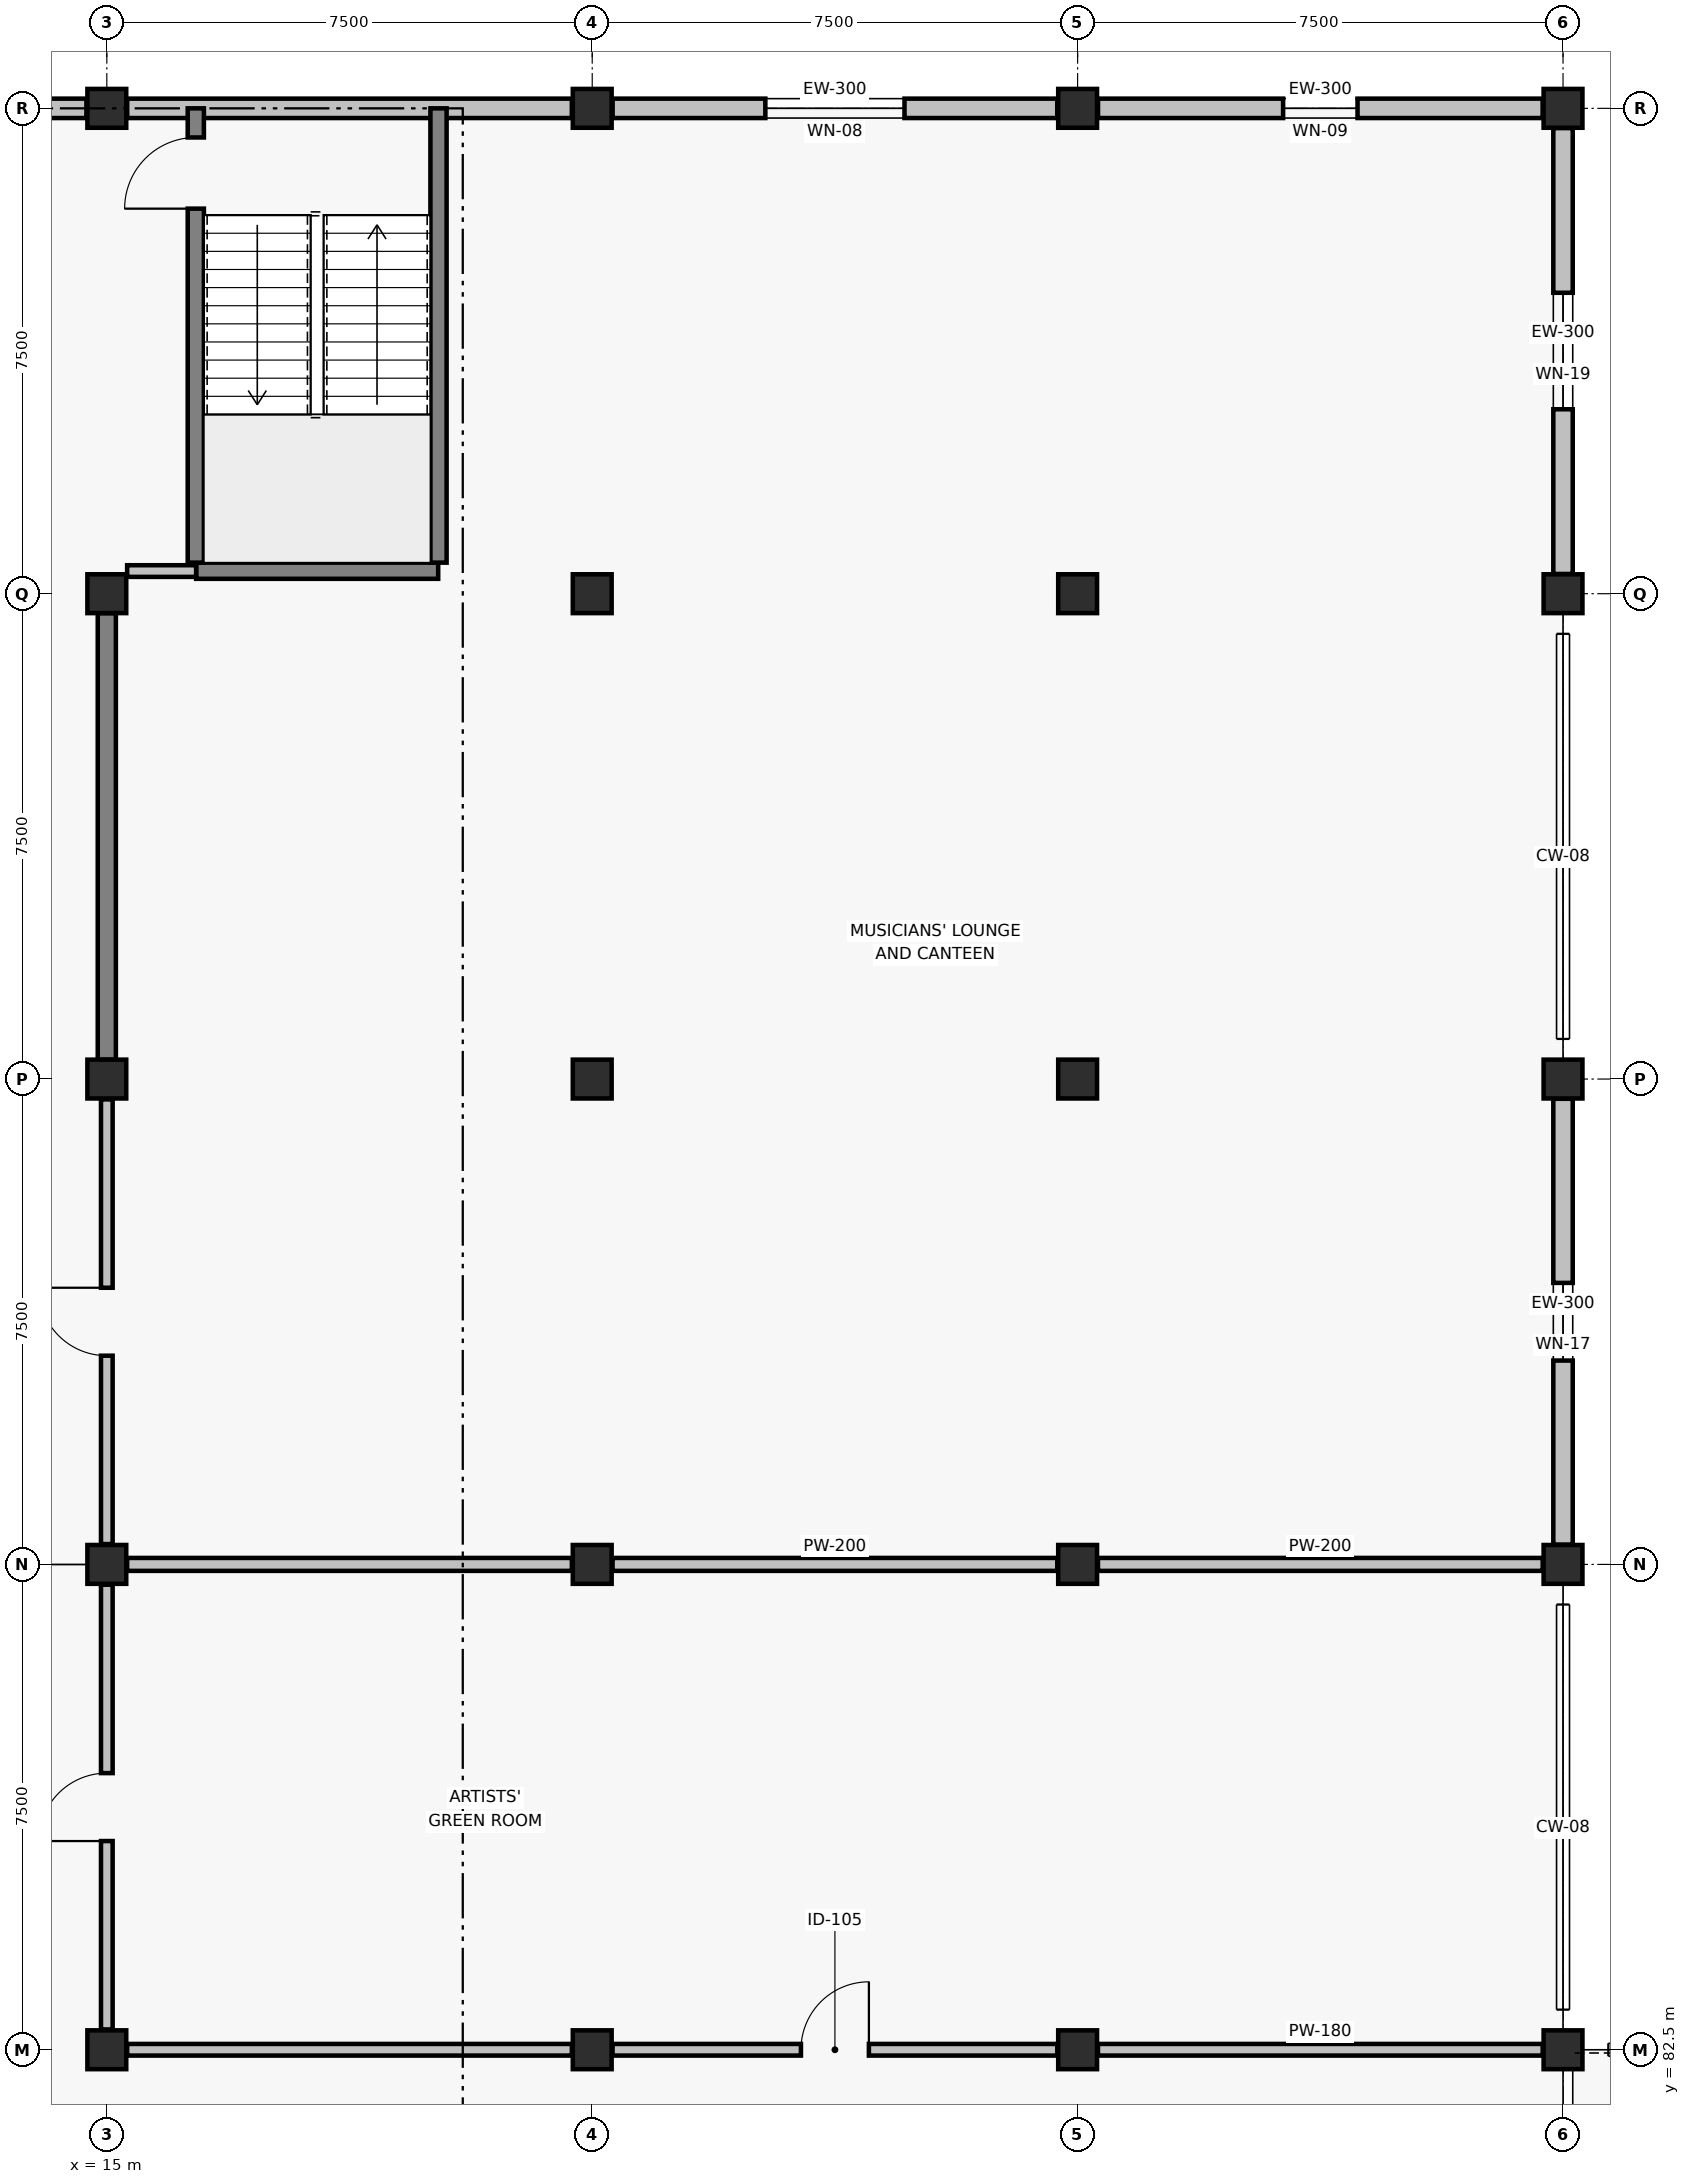
"""IFC4 building model, lengths in metres.
Left out: names, types, materials, properties, quantities, classifications, styles, units other than length and angle.
Written with IfcOpenShell. Run it as: python <this file> out.ifc"""

import sys

from ifc_helpers import new_model, si_unit, direction, frame, frame_2d, origin, origin_2d, place, context, subcontext, project, spatial, rectangle, extrude, element, fill, save


model = new_model("IFC4")
c1 = context("Model", 3, precision=1e-05, world=origin(), true_north=direction((0.0, 1.0)))
c2 = subcontext(c1, "Body", "Model", "MODEL_VIEW")
j1 = project(units=[si_unit("LENGTHUNIT", "METRE"), si_unit("PLANEANGLEUNIT", "RADIAN")], contexts=[c1])
p1 = place(None, origin())
s1 = spatial("IfcSite", under=j1, at=p1, CompositionType="ELEMENT")
p2 = place(p1, origin())
s2 = spatial("IfcBuilding", under=s1, at=p2, CompositionType="ELEMENT")
p3 = place(p2, frame((0.0, 0.0, 9.0)))
s3 = spatial("IfcBuildingStorey", under=s2, at=p3, CompositionType="ELEMENT", Elevation=9.0)
for number, where, z_axis, x_axis in (
    (1, (15.0, 82.5, 0.0), (0.0, 0.0, 1.0), (1.0, 0.0, 0.0)),
    (2, (15.0, 90.0, 0.0), (0.0, 0.0, 1.0), (1.0, 0.0, 0.0)),
    (3, (15.0, 97.5, 0.0), (0.0, 0.0, 1.0), (1.0, 0.0, 0.0)),
    (4, (15.0, 105.0, 0.0), (0.0, 0.0, 1.0), (1.0, 0.0, 0.0)),
    (5, (15.0, 112.5, 0.0), (0.0, 0.0, 1.0), (1.0, 0.0, 0.0)),
    (6, (22.5, 82.5, 0.0), (0.0, 0.0, 1.0), (1.0, 0.0, 0.0)),
    (7, (22.5, 90.0, 0.0), (0.0, 0.0, 1.0), (1.0, 0.0, 0.0)),
    (8, (22.5, 97.5, 0.0), (0.0, 0.0, 1.0), (1.0, 0.0, 0.0)),
    (9, (22.5, 105.0, 0.0), (0.0, 0.0, 1.0), (1.0, 0.0, 0.0)),
    (10, (22.5, 112.5, 0.0), (0.0, 0.0, 1.0), (1.0, 0.0, 0.0)),
    (11, (30.0, 82.5, 0.0), (0.0, 0.0, 1.0), (1.0, 0.0, 0.0)),
    (12, (30.0, 90.0, 0.0), (0.0, 0.0, 1.0), (1.0, 0.0, 0.0)),
    (13, (30.0, 97.5, 0.0), (0.0, 0.0, 1.0), (1.0, 0.0, 0.0)),
    (14, (30.0, 105.0, 0.0), (0.0, 0.0, 1.0), (1.0, 0.0, 0.0)),
    (15, (30.0, 112.5, 0.0), (0.0, 0.0, 1.0), (1.0, 0.0, 0.0)),
    (16, (37.5, 82.5, 0.0), (0.0, 0.0, 1.0), (1.0, 0.0, 0.0)),
    (17, (37.5, 90.0, 0.0), (0.0, 0.0, 1.0), (1.0, 0.0, 0.0)),
    (18, (37.5, 97.5, 0.0), (0.0, 0.0, 1.0), (1.0, 0.0, 0.0)),
    (19, (37.5, 105.0, 0.0), (0.0, 0.0, 1.0), (1.0, 0.0, 0.0)),
    (20, (37.5, 112.5, 0.0), (0.0, 0.0, 1.0), (1.0, 0.0, 0.0)),
):
    element("IfcColumn", number, at=place(p3, frame(where, z_axis=z_axis, x_axis=x_axis)), inside=s3, PredefinedType="COLUMN", context=c2, shape_type="SweptSolid", body=[
        extrude(rectangle(XDim=0.6, YDim=0.6, at=origin_2d()), origin(), (0.0, 0.0, 1.0), 4.2),
    ])
p4 = place(p3, frame((15.0, 97.8, 0.0), z_axis=(0.0, 0.0, 1.0), x_axis=(0.0, 1.0, 0.0)))
e21 = element("IfcWall", 21, at=p4, inside=s3, PredefinedType="SHEAR", context=c2, shape_type="SweptSolid", body=[
    extrude(rectangle(XDim=6.9, YDim=0.28, at=frame_2d((3.45, 0.0))), origin(), (0.0, 0.0, 1.0), 3.9),
])
p5 = place(p3, frame((8.12, 112.5, 0.0), z_axis=(0.0, 0.0, 1.0), x_axis=(1.0, 0.0, 0.0)))
e22 = element("IfcWall", 22, at=p5, inside=s3, PredefinedType="SOLIDWALL", context=c2, shape_type="SweptSolid", body=[
    extrude(rectangle(XDim=6.565, YDim=0.3, at=frame_2d((3.282, 0.0))), origin(), (0.0, 0.0, 1.0), 2.87),
])
p6 = place(p5, frame((2.205, 0.0, 0.6)))
e23 = element("IfcOpeningElement", 23, at=p6, cuts=e22, PredefinedType="OPENING", context=c2, shape_type="SweptSolid", body=[
    extrude(rectangle(XDim=1.85, YDim=1.8, at=frame_2d((0.925, 0.9))), frame((0.0, 0.16, 0.0), z_axis=(0.0, -1.0, 0.0), x_axis=(1.0, 0.0, 0.0)), (0.0, 0.0, 1.0), 0.32),
])
p7 = place(p3, frame((15.315, 112.5, 0.0), z_axis=(0.0, 0.0, 1.0), x_axis=(1.0, 0.0, 0.0)))
e24 = element("IfcWall", 24, at=p7, inside=s3, PredefinedType="SOLIDWALL", context=c2, shape_type="SweptSolid", body=[
    extrude(rectangle(XDim=6.87, YDim=0.3, at=frame_2d((3.435, 0.0))), origin(), (0.0, 0.0, 1.0), 2.87),
])
p8 = place(p3, frame((22.815, 112.5, 0.0), z_axis=(0.0, 0.0, 1.0), x_axis=(1.0, 0.0, 0.0)))
e25 = element("IfcWall", 25, at=p8, inside=s3, PredefinedType="SOLIDWALL", context=c2, shape_type="SweptSolid", body=[
    extrude(rectangle(XDim=6.87, YDim=0.3, at=frame_2d((3.435, 0.0))), origin(), (0.0, 0.0, 1.0), 3.12),
])
p9 = place(p8, frame((2.36, 0.0, 0.6)))
e26 = element("IfcOpeningElement", 26, at=p9, cuts=e25, PredefinedType="OPENING", context=c2, shape_type="SweptSolid", body=[
    extrude(rectangle(XDim=2.15, YDim=1.45, at=frame_2d((1.075, 0.725))), frame((0.0, 0.16, 0.0), z_axis=(0.0, -1.0, 0.0), x_axis=(1.0, 0.0, 0.0)), (0.0, 0.0, 1.0), 0.32),
])
p10 = place(p3, frame((30.315, 112.5, 0.0), z_axis=(0.0, 0.0, 1.0), x_axis=(1.0, 0.0, 0.0)))
e27 = element("IfcWall", 27, at=p10, inside=s3, PredefinedType="SOLIDWALL", context=c2, shape_type="SweptSolid", body=[
    extrude(rectangle(XDim=6.87, YDim=0.3, at=frame_2d((3.435, 0.0))), origin(), (0.0, 0.0, 1.0), 3.12),
])
p11 = place(p10, frame((2.86, 0.0, 0.6)))
e28 = element("IfcOpeningElement", 28, at=p11, cuts=e27, PredefinedType="OPENING", context=c2, shape_type="SweptSolid", body=[
    extrude(rectangle(XDim=1.15, YDim=1.3, at=frame_2d((0.575, 0.65))), frame((0.0, 0.16, 0.0), z_axis=(0.0, -1.0, 0.0), x_axis=(1.0, 0.0, 0.0)), (0.0, 0.0, 1.0), 0.32),
])
p12 = place(p3, frame((37.5, 90.305, 0.0), z_axis=(0.0, 0.0, 1.0), x_axis=(0.0, 1.0, 0.0)))
e29 = element("IfcWall", 29, at=p12, inside=s3, PredefinedType="SOLIDWALL", context=c2, shape_type="SweptSolid", body=[
    extrude(rectangle(XDim=6.89, YDim=0.3, at=frame_2d((3.445, 0.0))), origin(), (0.0, 0.0, 1.0), 2.92),
])
p13 = place(p12, frame((2.845, 0.0, 0.6)))
e30 = element("IfcOpeningElement", 30, at=p13, cuts=e29, PredefinedType="OPENING", context=c2, shape_type="SweptSolid", body=[
    extrude(rectangle(XDim=1.2, YDim=1.2, at=frame_2d((0.6, 0.6))), frame((0.0, 0.16, 0.0), z_axis=(0.0, -1.0, 0.0), x_axis=(1.0, 0.0, 0.0)), (0.0, 0.0, 1.0), 0.32),
])
p14 = place(p3, frame((37.5, 105.305, 0.0), z_axis=(0.0, 0.0, 1.0), x_axis=(0.0, 1.0, 0.0)))
e31 = element("IfcWall", 31, at=p14, inside=s3, PredefinedType="SOLIDWALL", context=c2, shape_type="SweptSolid", body=[
    extrude(rectangle(XDim=6.89, YDim=0.3, at=frame_2d((3.445, 0.0))), origin(), (0.0, 0.0, 1.0), 3.07),
])
p15 = place(p14, frame((2.545, 0.0, 0.6)))
e32 = element("IfcOpeningElement", 32, at=p15, cuts=e31, PredefinedType="OPENING", context=c2, shape_type="SweptSolid", body=[
    extrude(rectangle(XDim=1.8, YDim=1.2, at=frame_2d((0.9, 0.6))), frame((0.0, 0.16, 0.0), z_axis=(0.0, -1.0, 0.0), x_axis=(1.0, 0.0, 0.0)), (0.0, 0.0, 1.0), 0.32),
])
p16 = place(p3, frame((16.38, 105.355, 0.0), z_axis=(0.0, 0.0, 1.0), x_axis=(1.0, 0.0, 0.0)))
e33 = element("IfcWall", 33, at=p16, inside=s3, PredefinedType="SOLIDWALL", context=c2, shape_type="SweptSolid", body=[
    extrude(rectangle(XDim=3.74, YDim=0.25, at=frame_2d((1.87, 0.0))), origin(), (0.0, 0.0, 1.0), 3.92),
])
p17 = place(p3, frame((16.375, 105.48, 0.0), z_axis=(0.0, 0.0, 1.0), x_axis=(0.0, 1.0, 0.0)))
e34 = element("IfcWall", 34, at=p17, inside=s3, PredefinedType="SOLIDWALL", context=c2, shape_type="SweptSolid", body=[
    extrude(rectangle(XDim=7.02, YDim=0.25, at=frame_2d((3.51, 0.0))), origin(), (0.0, 0.0, 1.0), 3.92),
])
p18 = place(p17, frame((5.47, 0.0, 0.0)))
e35 = element("IfcOpeningElement", 35, at=p18, cuts=e34, PredefinedType="OPENING", context=c2, shape_type="SweptSolid", body=[
    extrude(rectangle(XDim=1.1, YDim=2.15, at=frame_2d((0.55, 1.075))), frame((0.0, 0.135, 0.0), z_axis=(0.0, -1.0, 0.0), x_axis=(1.0, 0.0, 0.0)), (0.0, 0.0, 1.0), 0.27),
])
p19 = place(p3, frame((20.125, 105.48, 0.0), z_axis=(0.0, 0.0, 1.0), x_axis=(0.0, 1.0, 0.0)))
e36 = element("IfcWall", 36, at=p19, inside=s3, PredefinedType="SOLIDWALL", context=c2, shape_type="SweptSolid", body=[
    extrude(rectangle(XDim=7.02, YDim=0.25, at=frame_2d((3.51, 0.0))), origin(), (0.0, 0.0, 1.0), 3.92),
])
p20 = place(p3, frame((15.314, 105.35, 0.0), z_axis=(0.0, 0.0, 1.0), x_axis=(1.0, 0.0, 0.0)))
e37 = element("IfcWall", 37, at=p20, inside=s3, PredefinedType="PARTITIONING", context=c2, shape_type="SweptSolid", body=[
    extrude(rectangle(XDim=1.066, YDim=0.18, at=frame_2d((0.533, 0.0))), origin(), (0.0, 0.0, 1.0), 2.82),
])
p21 = place(p3, frame((15.314, 82.5, 0.0), z_axis=(0.0, 0.0, 1.0), x_axis=(1.0, 0.0, 0.0)))
e38 = element("IfcWall", 38, at=p21, inside=s3, PredefinedType="PARTITIONING", context=c2, shape_type="SweptSolid", body=[
    extrude(rectangle(XDim=6.872, YDim=0.18, at=frame_2d((3.436, 0.0))), origin(), (0.0, 0.0, 1.0), 2.87),
])
p22 = place(p3, frame((22.814, 82.5, 0.0), z_axis=(0.0, 0.0, 1.0), x_axis=(1.0, 0.0, 0.0)))
e39 = element("IfcWall", 39, at=p22, inside=s3, PredefinedType="PARTITIONING", context=c2, shape_type="SweptSolid", body=[
    extrude(rectangle(XDim=6.872, YDim=0.18, at=frame_2d((3.436, 0.0))), origin(), (0.0, 0.0, 1.0), 2.82),
])
p23 = place(p22, frame((2.911, 0.0, 0.0)))
e40 = element("IfcOpeningElement", 40, at=p23, cuts=e39, PredefinedType="OPENING", context=c2, shape_type="SweptSolid", body=[
    extrude(rectangle(XDim=1.05, YDim=2.12, at=frame_2d((0.525, 1.06))), frame((0.0, 0.1, 0.0), z_axis=(0.0, -1.0, 0.0), x_axis=(1.0, 0.0, 0.0)), (0.0, 0.0, 1.0), 0.2),
])
p24 = place(p3, frame((30.314, 82.5, 0.0), z_axis=(0.0, 0.0, 1.0), x_axis=(1.0, 0.0, 0.0)))
e41 = element("IfcWall", 41, at=p24, inside=s3, PredefinedType="PARTITIONING", context=c2, shape_type="SweptSolid", body=[
    extrude(rectangle(XDim=6.872, YDim=0.18, at=frame_2d((3.436, 0.0))), origin(), (0.0, 0.0, 1.0), 2.82),
])
for number, where, z_axis, x_axis in (
    (42, (15.314, 90.0, 0.0), (0.0, 0.0, 1.0), (1.0, 0.0, 0.0)),
    (43, (22.814, 90.0, 0.0), (0.0, 0.0, 1.0), (1.0, 0.0, 0.0)),
    (44, (30.314, 90.0, 0.0), (0.0, 0.0, 1.0), (1.0, 0.0, 0.0)),
):
    element("IfcWall", number, at=place(p3, frame(where, z_axis=z_axis, x_axis=x_axis)), inside=s3, PredefinedType="PARTITIONING", context=c2, shape_type="SweptSolid", body=[
        extrude(rectangle(XDim=6.872, YDim=0.2, at=frame_2d((3.436, 0.0))), origin(), (0.0, 0.0, 1.0), 2.82),
    ])
p25 = place(p3, frame((15.0, 82.814, 0.0), z_axis=(0.0, 0.0, 1.0), x_axis=(0.0, 1.0, 0.0)))
e45 = element("IfcWall", 45, at=p25, inside=s3, PredefinedType="PARTITIONING", context=c2, shape_type="SweptSolid", body=[
    extrude(rectangle(XDim=6.872, YDim=0.18, at=frame_2d((3.436, 0.0))), origin(), (0.0, 0.0, 1.0), 2.87),
])
p26 = place(p25, frame((2.911, 0.0, 0.0)))
e46 = element("IfcOpeningElement", 46, at=p26, cuts=e45, PredefinedType="OPENING", context=c2, shape_type="SweptSolid", body=[
    extrude(rectangle(XDim=1.05, YDim=2.12, at=frame_2d((0.525, 1.06))), frame((0.0, 0.1, 0.0), z_axis=(0.0, -1.0, 0.0), x_axis=(1.0, 0.0, 0.0)), (0.0, 0.0, 1.0), 0.2),
])
p27 = place(p3, frame((15.0, 90.314, 0.0), z_axis=(0.0, 0.0, 1.0), x_axis=(0.0, 1.0, 0.0)))
e47 = element("IfcWall", 47, at=p27, inside=s3, PredefinedType="PARTITIONING", context=c2, shape_type="SweptSolid", body=[
    extrude(rectangle(XDim=6.872, YDim=0.18, at=frame_2d((3.436, 0.0))), origin(), (0.0, 0.0, 1.0), 2.87),
])
p28 = place(p27, frame((2.911, 0.0, 0.0)))
e48 = element("IfcOpeningElement", 48, at=p28, cuts=e47, PredefinedType="OPENING", context=c2, shape_type="SweptSolid", body=[
    extrude(rectangle(XDim=1.05, YDim=2.12, at=frame_2d((0.525, 1.06))), frame((0.0, 0.1, 0.0), z_axis=(0.0, -1.0, 0.0), x_axis=(1.0, 0.0, 0.0)), (0.0, 0.0, 1.0), 0.2),
])
p29 = place(p9, origin())
e49 = element("IfcWindow", 49, at=p29, inside=s3, PartitioningType="SINGLE_PANEL", PredefinedType="WINDOW", context=c2, shape_type="SweptSolid", body=[
    extrude(rectangle(XDim=2.15, YDim=1.45, at=frame_2d((1.075, 0.725))), frame((0.0, 0.03, 0.0), z_axis=(0.0, -1.0, 0.0), x_axis=(1.0, 0.0, 0.0)), (0.0, 0.0, 1.0), 0.06),
])
fill(e26, e49)
p30 = place(p11, origin())
e50 = element("IfcWindow", 50, at=p30, inside=s3, PartitioningType="SINGLE_PANEL", PredefinedType="WINDOW", context=c2, shape_type="SweptSolid", body=[
    extrude(rectangle(XDim=1.15, YDim=1.3, at=frame_2d((0.575, 0.65))), frame((0.0, 0.03, 0.0), z_axis=(0.0, -1.0, 0.0), x_axis=(1.0, 0.0, 0.0)), (0.0, 0.0, 1.0), 0.06),
])
fill(e28, e50)
p31 = place(p13, origin())
e51 = element("IfcWindow", 51, at=p31, inside=s3, PartitioningType="SINGLE_PANEL", PredefinedType="WINDOW", context=c2, shape_type="SweptSolid", body=[
    extrude(rectangle(XDim=1.2, YDim=1.2, at=frame_2d((0.6, 0.6))), frame((0.0, 0.03, 0.0), z_axis=(0.0, -1.0, 0.0), x_axis=(1.0, 0.0, 0.0)), (0.0, 0.0, 1.0), 0.06),
])
fill(e30, e51)
p32 = place(p15, origin())
e52 = element("IfcWindow", 52, at=p32, inside=s3, PartitioningType="SINGLE_PANEL", PredefinedType="WINDOW", context=c2, shape_type="SweptSolid", body=[
    extrude(rectangle(XDim=1.8, YDim=1.2, at=frame_2d((0.9, 0.6))), frame((0.0, 0.03, 0.0), z_axis=(0.0, -1.0, 0.0), x_axis=(1.0, 0.0, 0.0)), (0.0, 0.0, 1.0), 0.06),
])
fill(e32, e52)
p33 = place(p18, origin())
e53 = element("IfcDoor", 53, at=p33, inside=s3, OperationType="SINGLE_SWING_LEFT", PredefinedType="DOOR", context=c2, shape_type="SweptSolid", body=[
    extrude(rectangle(XDim=1.1, YDim=2.15, at=frame_2d((0.55, 1.075))), frame((0.0, 0.025, 0.0), z_axis=(0.0, -1.0, 0.0), x_axis=(1.0, 0.0, 0.0)), (0.0, 0.0, 1.0), 0.05),
])
fill(e35, e53)
p34 = place(p23, origin())
e54 = element("IfcDoor", 54, at=p34, inside=s3, OperationType="SINGLE_SWING_RIGHT", PredefinedType="DOOR", context=c2, shape_type="SweptSolid", body=[
    extrude(rectangle(XDim=1.05, YDim=2.12, at=frame_2d((0.525, 1.06))), frame((0.0, 0.025, 0.0), z_axis=(0.0, -1.0, 0.0), x_axis=(1.0, 0.0, 0.0)), (0.0, 0.0, 1.0), 0.05),
])
fill(e40, e54)
p35 = place(p26, origin())
e55 = element("IfcDoor", 55, at=p35, inside=s3, OperationType="SINGLE_SWING_LEFT", PredefinedType="DOOR", context=c2, shape_type="SweptSolid", body=[
    extrude(rectangle(XDim=1.05, YDim=2.12, at=frame_2d((0.525, 1.06))), frame((0.0, 0.025, 0.0), z_axis=(0.0, -1.0, 0.0), x_axis=(1.0, 0.0, 0.0)), (0.0, 0.0, 1.0), 0.05),
])
fill(e46, e55)
p36 = place(p28, origin())
e56 = element("IfcDoor", 56, at=p36, inside=s3, OperationType="SINGLE_SWING_RIGHT", PredefinedType="DOOR", context=c2, shape_type="SweptSolid", body=[
    extrude(rectangle(XDim=1.05, YDim=2.12, at=frame_2d((0.525, 1.06))), frame((0.0, 0.025, 0.0), z_axis=(0.0, -1.0, 0.0), x_axis=(1.0, 0.0, 0.0)), (0.0, 0.0, 1.0), 0.05),
])
fill(e48, e56)
save(model, sys.argv[1])
